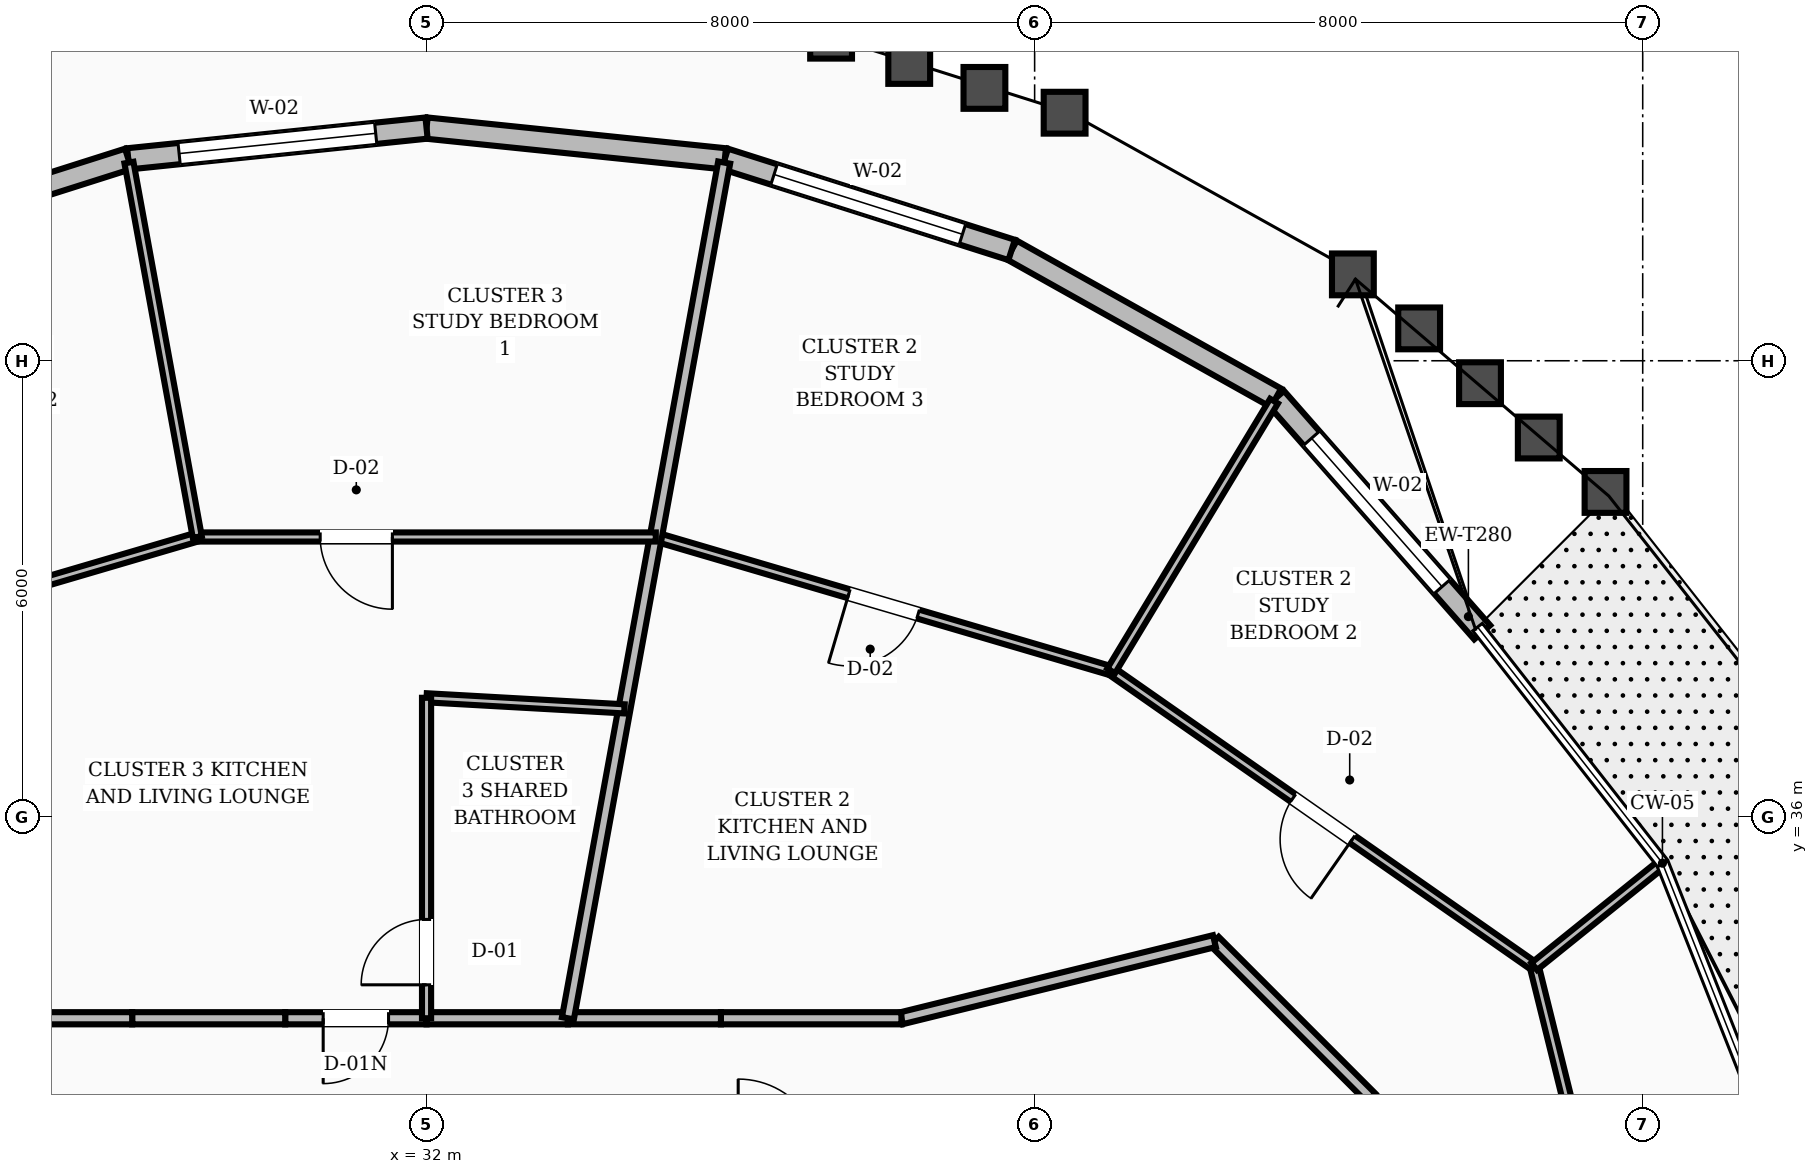
"""IFC4 building model, lengths in metres.
Left out: names, types, materials, properties, quantities, classifications, styles, units other than length and angle.
Written with IfcOpenShell. Run it as: python <this file> out.ifc"""

import sys

from ifc_helpers import new_model, si_unit, direction, frame, frame_2d, origin, place, context, subcontext, project, spatial, rectangle, extrude, element, fill, save


model = new_model("IFC4")
c1 = context("Model", 3, precision=1e-05, world=origin(), true_north=direction((0.0, 1.0)))
c2 = subcontext(c1, "Body", "Model", "MODEL_VIEW")
j1 = project(units=[si_unit("LENGTHUNIT", "METRE"), si_unit("PLANEANGLEUNIT", "RADIAN")], contexts=[c1])
p1 = place(None, origin())
s1 = spatial("IfcSite", under=j1, at=p1, CompositionType="ELEMENT")
p2 = place(p1, origin())
s2 = spatial("IfcBuilding", under=s1, at=p2, CompositionType="ELEMENT")
p3 = place(p2, frame((0.0, 0.0, 261.6)))
s3 = spatial("IfcBuildingStorey", under=s2, at=p3, CompositionType="ELEMENT", Elevation=261.6)
p4 = place(p3, frame((45.888, 38.427, 0.0), z_axis=(0.0, 0.0, 1.0), x_axis=(-0.660459054775, 0.750862062543, 0.0)))
e1 = element("IfcWall", 1, at=p4, inside=s3, PredefinedType="STANDARD", context=c2, shape_type="SweptSolid", body=[
    extrude(rectangle(XDim=4.108, YDim=0.28, at=frame_2d((2.054, 0.0))), origin(), (0.0, 0.0, 1.0), 2.88),
])
p5 = place(p4, frame((0.8, 0.0, 0.8)))
e2 = element("IfcOpeningElement", 2, at=p5, cuts=e1, PredefinedType="OPENING", context=c2, shape_type="SweptSolid", body=[
    extrude(rectangle(XDim=2.6, YDim=1.65, at=frame_2d((1.3, 0.825))), frame((0.0, 0.15, 0.0), z_axis=(0.0, -1.0, 0.0), x_axis=(1.0, 0.0, 0.0)), (0.0, 0.0, 1.0), 0.3),
])
p6 = place(p3, frame((43.175, 41.512, 0.0), z_axis=(0.0, 0.0, 1.0), x_axis=(-0.872627171538, 0.488386956719, 0.0)))
e3 = element("IfcWall", 3, at=p6, inside=s3, PredefinedType="STANDARD", context=c2, shape_type="SweptSolid", body=[
    extrude(rectangle(XDim=3.985, YDim=0.28, at=frame_2d((1.993, 0.0))), origin(), (0.0, 0.0, 1.0), 2.88),
])
p7 = place(p3, frame((39.698, 43.458, 0.0), z_axis=(0.0, 0.0, 1.0), x_axis=(-0.953082762893, 0.302709839741, 0.0)))
e4 = element("IfcWall", 4, at=p7, inside=s3, PredefinedType="STANDARD", context=c2, shape_type="SweptSolid", body=[
    extrude(rectangle(XDim=3.959, YDim=0.28, at=frame_2d((1.979, 0.0))), origin(), (0.0, 0.0, 1.0), 2.88),
])
p8 = place(p7, frame((0.68, 0.0, 0.8)))
e5 = element("IfcOpeningElement", 5, at=p8, cuts=e4, PredefinedType="OPENING", context=c2, shape_type="SweptSolid", body=[
    extrude(rectangle(XDim=2.6, YDim=1.65, at=frame_2d((1.3, 0.825))), frame((0.0, 0.15, 0.0), z_axis=(0.0, -1.0, 0.0), x_axis=(1.0, 0.0, 0.0)), (0.0, 0.0, 1.0), 0.3),
])
p9 = place(p3, frame((35.924, 44.656, 0.0), z_axis=(0.0, 0.0, 1.0), x_axis=(-0.994722327851, 0.10260355976, 0.0)))
e6 = element("IfcWall", 6, at=p9, inside=s3, PredefinedType="STANDARD", context=c2, shape_type="SweptSolid", body=[
    extrude(rectangle(XDim=3.945, YDim=0.28, at=frame_2d((1.973, 0.0))), origin(), (0.0, 0.0, 1.0), 2.88),
])
p10 = place(p3, frame((32.0, 45.061, 0.0), z_axis=(0.0, 0.0, 1.0), x_axis=(-0.994722327851, -0.10260355976, 0.0)))
e7 = element("IfcWall", 7, at=p10, inside=s3, PredefinedType="STANDARD", context=c2, shape_type="SweptSolid", body=[
    extrude(rectangle(XDim=3.945, YDim=0.28, at=frame_2d((1.973, 0.0))), origin(), (0.0, 0.0, 1.0), 2.88),
])
p11 = place(p10, frame((0.673, 0.0, 0.8)))
e8 = element("IfcOpeningElement", 8, at=p11, cuts=e7, PredefinedType="OPENING", context=c2, shape_type="SweptSolid", body=[
    extrude(rectangle(XDim=2.6, YDim=1.65, at=frame_2d((1.3, 0.825))), frame((0.0, 0.15, 0.0), z_axis=(0.0, -1.0, 0.0), x_axis=(1.0, 0.0, 0.0)), (0.0, 0.0, 1.0), 0.3),
])
p12 = place(p3, frame((28.076, 44.656, 0.0), z_axis=(0.0, 0.0, 1.0), x_axis=(-0.953082762893, -0.302709839741, 0.0)))
e9 = element("IfcWall", 9, at=p12, inside=s3, PredefinedType="STANDARD", context=c2, shape_type="SweptSolid", body=[
    extrude(rectangle(XDim=3.959, YDim=0.28, at=frame_2d((1.979, 0.0))), origin(), (0.0, 0.0, 1.0), 2.88),
])
p13 = place(p3, frame((44.427, 32.303, 0.0), z_axis=(0.0, 0.0, 1.0), x_axis=(-0.707106781187, 0.707106781187, 0.0)))
e10 = element("IfcWall", 10, at=p13, inside=s3, PredefinedType="SOLIDWALL", context=c2, shape_type="SweptSolid", body=[
    extrude(rectangle(XDim=2.916, YDim=0.16, at=frame_2d((1.458, 0.0))), origin(), (0.0, 0.0, 1.0), 2.87),
])
p14 = place(p3, frame((42.365, 34.365, 0.0), z_axis=(0.0, 0.0, 1.0), x_axis=(-0.970939799552, -0.239323850978, 0.0)))
e11 = element("IfcWall", 11, at=p14, inside=s3, PredefinedType="SOLIDWALL", context=c2, shape_type="SweptSolid", body=[
    extrude(rectangle(XDim=4.241, YDim=0.16, at=frame_2d((2.12, 0.0))), origin(), (0.0, 0.0, 1.0), 2.87),
])
p15 = place(p3, frame((38.248, 33.35, 0.0), z_axis=(0.0, 0.0, 1.0), x_axis=(-1.0, 0.0, 0.0)))
e12 = element("IfcWall", 12, at=p15, inside=s3, PredefinedType="SOLIDWALL", context=c2, shape_type="SweptSolid", body=[
    extrude(rectangle(XDim=2.375, YDim=0.16, at=frame_2d((1.188, 0.0))), origin(), (0.0, 0.0, 1.0), 2.87),
])
p16 = place(p3, frame((35.873, 33.35, 0.0), z_axis=(0.0, 0.0, 1.0), x_axis=(-1.0, 0.0, 0.0)))
e13 = element("IfcWall", 13, at=p16, inside=s3, PredefinedType="SOLIDWALL", context=c2, shape_type="SweptSolid", body=[
    extrude(rectangle(XDim=2.013, YDim=0.16, at=frame_2d((1.006, 0.0))), origin(), (0.0, 0.0, 1.0), 2.87),
])
p17 = place(p3, frame((33.86, 33.35, 0.0), z_axis=(0.0, 0.0, 1.0), x_axis=(-1.0, 0.0, 0.0)))
e14 = element("IfcWall", 14, at=p17, inside=s3, PredefinedType="SOLIDWALL", context=c2, shape_type="SweptSolid", body=[
    extrude(rectangle(XDim=1.86, YDim=0.16, at=frame_2d((0.93, 0.0))), origin(), (0.0, 0.0, 1.0), 2.87),
])
p18 = place(p3, frame((32.0, 33.35, 0.0), z_axis=(0.0, 0.0, 1.0), x_axis=(-1.0, 0.0, 0.0)))
e15 = element("IfcWall", 15, at=p18, inside=s3, PredefinedType="SOLIDWALL", context=c2, shape_type="SweptSolid", body=[
    extrude(rectangle(XDim=1.86, YDim=0.16, at=frame_2d((0.93, 0.0))), origin(), (0.0, 0.0, 1.0), 2.87),
])
p19 = place(p18, frame((0.5, 0.0, 0.0)))
e16 = element("IfcOpeningElement", 16, at=p19, cuts=e15, PredefinedType="OPENING", context=c2, shape_type="SweptSolid", body=[
    extrude(rectangle(XDim=0.86, YDim=2.1, at=frame_2d((0.43, 1.05))), frame((0.0, 0.09, 0.0), z_axis=(0.0, -1.0, 0.0), x_axis=(1.0, 0.0, 0.0)), (0.0, 0.0, 1.0), 0.18),
])
p20 = place(p3, frame((30.14, 33.35, 0.0), z_axis=(0.0, 0.0, 1.0), x_axis=(-1.0, 0.0, 0.0)))
e17 = element("IfcWall", 17, at=p20, inside=s3, PredefinedType="SOLIDWALL", context=c2, shape_type="SweptSolid", body=[
    extrude(rectangle(XDim=2.013, YDim=0.16, at=frame_2d((1.006, 0.0))), origin(), (0.0, 0.0, 1.0), 2.87),
])
p21 = place(p3, frame((28.127, 33.35, 0.0), z_axis=(0.0, 0.0, 1.0), x_axis=(-1.0, 0.0, 0.0)))
e18 = element("IfcWall", 18, at=p21, inside=s3, PredefinedType="SOLIDWALL", context=c2, shape_type="SweptSolid", body=[
    extrude(rectangle(XDim=2.375, YDim=0.16, at=frame_2d((1.188, 0.0))), origin(), (0.0, 0.0, 1.0), 2.87),
])
p22 = place(p3, frame((48.232, 27.332, 0.0), z_axis=(0.0, 0.0, 1.0), x_axis=(-0.240321088177, 0.970693450363, 0.0)))
e19 = element("IfcWall", 19, at=p22, inside=s3, PredefinedType="PARTITIONING", context=c2, shape_type="SweptSolid", body=[
    extrude(rectangle(XDim=6.902, YDim=0.12, at=frame_2d((3.451, 0.0))), origin(), (0.0, 0.0, 1.0), 2.87),
])
p23 = place(p22, frame((4.092, 0.0, 0.0)))
e20 = element("IfcOpeningElement", 20, at=p23, cuts=e19, PredefinedType="OPENING", context=c2, shape_type="SweptSolid", body=[
    extrude(rectangle(XDim=0.95, YDim=2.1, at=frame_2d((0.475, 1.05))), frame((0.0, 0.07, 0.0), z_axis=(0.0, -1.0, 0.0), x_axis=(1.0, 0.0, 0.0)), (0.0, 0.0, 1.0), 0.14),
])
p24 = place(p3, frame((46.573, 34.032, 0.0), z_axis=(0.0, 0.0, 1.0), x_axis=(-0.819731618805, 0.572747826824, 0.0)))
e21 = element("IfcWall", 21, at=p24, inside=s3, PredefinedType="PARTITIONING", context=c2, shape_type="SweptSolid", body=[
    extrude(rectangle(XDim=6.79, YDim=0.12, at=frame_2d((3.395, 0.0))), origin(), (0.0, 0.0, 1.0), 2.87),
])
p25 = place(p24, frame((2.92, 0.0, 0.0)))
e22 = element("IfcOpeningElement", 22, at=p25, cuts=e21, PredefinedType="OPENING", context=c2, shape_type="SweptSolid", body=[
    extrude(rectangle(XDim=0.95, YDim=2.1, at=frame_2d((0.475, 1.05))), frame((0.0, 0.07, 0.0), z_axis=(0.0, -1.0, 0.0), x_axis=(1.0, 0.0, 0.0)), (0.0, 0.0, 1.0), 0.14),
])
p26 = place(p3, frame((46.573, 34.032, 0.0), z_axis=(0.0, 0.0, 1.0), x_axis=(0.778905804769, 0.62714093097, 0.0)))
e23 = element("IfcWall", 23, at=p26, inside=s3, PredefinedType="PARTITIONING", context=c2, shape_type="SweptSolid", body=[
    extrude(rectangle(XDim=2.115, YDim=0.12, at=frame_2d((1.058, 0.0))), origin(), (0.0, 0.0, 1.0), 2.87),
])
p27 = place(p3, frame((41.007, 37.921, 0.0), z_axis=(0.0, 0.0, 1.0), x_axis=(-0.959414668212, 0.281999103578, 0.0)))
e24 = element("IfcWall", 24, at=p27, inside=s3, PredefinedType="PARTITIONING", context=c2, shape_type="SweptSolid", body=[
    extrude(rectangle(XDim=6.245, YDim=0.12, at=frame_2d((3.122, 0.0))), origin(), (0.0, 0.0, 1.0), 2.87),
])
p28 = place(p27, frame((2.647, 0.0, 0.0)))
e25 = element("IfcOpeningElement", 25, at=p28, cuts=e24, PredefinedType="OPENING", context=c2, shape_type="SweptSolid", body=[
    extrude(rectangle(XDim=0.95, YDim=2.1, at=frame_2d((0.475, 1.05))), frame((0.0, 0.07, 0.0), z_axis=(0.0, -1.0, 0.0), x_axis=(1.0, 0.0, 0.0)), (0.0, 0.0, 1.0), 0.14),
])
p29 = place(p3, frame((41.007, 37.921, 0.0), z_axis=(0.0, 0.0, 1.0), x_axis=(0.516901675456, 0.856044775646, 0.0)))
e26 = element("IfcWall", 26, at=p29, inside=s3, PredefinedType="PARTITIONING", context=c2, shape_type="SweptSolid", body=[
    extrude(rectangle(XDim=4.145, YDim=0.12, at=frame_2d((2.073, 0.0))), origin(), (0.0, 0.0, 1.0), 2.87),
])
p30 = place(p3, frame((33.86, 33.35, 0.0), z_axis=(0.0, 0.0, 1.0), x_axis=(0.17961571379, 0.9837368527, 0.0)))
e27 = element("IfcWall", 27, at=p30, inside=s3, PredefinedType="SOLIDWALL", context=c2, shape_type="SweptSolid", body=[
    extrude(rectangle(XDim=11.443, YDim=0.16, at=frame_2d((5.722, 0.0))), origin(), (0.0, 0.0, 1.0), 2.87),
])
p31 = place(p3, frame((34.603, 37.42, 0.0), z_axis=(0.0, 0.0, 1.0), x_axis=(-0.998441277422, 0.055812324268, 0.0)))
e28 = element("IfcWall", 28, at=p31, inside=s3, PredefinedType="PARTITIONING", context=c2, shape_type="SweptSolid", body=[
    extrude(rectangle(XDim=2.607, YDim=0.12, at=frame_2d((1.304, 0.0))), origin(), (0.0, 0.0, 1.0), 2.87),
])
p32 = place(p3, frame((32.0, 33.35, 0.0), z_axis=(0.0, 0.0, 1.0), x_axis=(0.0, 1.0, 0.0)))
e29 = element("IfcWall", 29, at=p32, inside=s3, PredefinedType="PARTITIONING", context=c2, shape_type="SweptSolid", body=[
    extrude(rectangle(XDim=4.216, YDim=0.12, at=frame_2d((2.108, 0.0))), origin(), (0.0, 0.0, 1.0), 2.87),
])
p33 = place(p32, frame((0.44, 0.0, 0.0)))
e30 = element("IfcOpeningElement", 30, at=p33, cuts=e29, PredefinedType="OPENING", context=c2, shape_type="SweptSolid", body=[
    extrude(rectangle(XDim=0.86, YDim=2.1, at=frame_2d((0.43, 1.05))), frame((0.0, 0.07, 0.0), z_axis=(0.0, -1.0, 0.0), x_axis=(1.0, 0.0, 0.0)), (0.0, 0.0, 1.0), 0.14),
])
p34 = place(p3, frame((35.016, 39.682, 0.0), z_axis=(0.0, 0.0, 1.0), x_axis=(-1.0, 0.0, 0.0)))
e31 = element("IfcWall", 31, at=p34, inside=s3, PredefinedType="PARTITIONING", context=c2, shape_type="SweptSolid", body=[
    extrude(rectangle(XDim=6.032, YDim=0.12, at=frame_2d((3.016, 0.0))), origin(), (0.0, 0.0, 1.0), 2.87),
])
p35 = place(p34, frame((3.465, 0.0, 0.0)))
e32 = element("IfcOpeningElement", 32, at=p35, cuts=e31, PredefinedType="OPENING", context=c2, shape_type="SweptSolid", body=[
    extrude(rectangle(XDim=0.95, YDim=2.1, at=frame_2d((0.475, 1.05))), frame((0.0, 0.07, 0.0), z_axis=(0.0, -1.0, 0.0), x_axis=(1.0, 0.0, 0.0)), (0.0, 0.0, 1.0), 0.14),
])
p36 = place(p3, frame((28.984, 39.682, 0.0), z_axis=(0.0, 0.0, 1.0), x_axis=(-0.959414668212, -0.281999103578, 0.0)))
e33 = element("IfcWall", 33, at=p36, inside=s3, PredefinedType="PARTITIONING", context=c2, shape_type="SweptSolid", body=[
    extrude(rectangle(XDim=6.245, YDim=0.12, at=frame_2d((3.122, 0.0))), origin(), (0.0, 0.0, 1.0), 2.87),
])
p37 = place(p36, frame((2.647, 0.0, 0.0)))
e34 = element("IfcOpeningElement", 34, at=p37, cuts=e33, PredefinedType="OPENING", context=c2, shape_type="SweptSolid", body=[
    extrude(rectangle(XDim=0.95, YDim=2.1, at=frame_2d((0.475, 1.05))), frame((0.0, 0.07, 0.0), z_axis=(0.0, -1.0, 0.0), x_axis=(1.0, 0.0, 0.0)), (0.0, 0.0, 1.0), 0.14),
])
p38 = place(p3, frame((28.984, 39.682, 0.0), z_axis=(0.0, 0.0, 1.0), x_axis=(-0.179623384496, 0.983735452112, 0.0)))
e35 = element("IfcWall", 35, at=p38, inside=s3, PredefinedType="PARTITIONING", context=c2, shape_type="SweptSolid", body=[
    extrude(rectangle(XDim=5.007, YDim=0.12, at=frame_2d((2.504, 0.0))), origin(), (0.0, 0.0, 1.0), 2.87),
])
p39 = place(p5, origin())
e36 = element("IfcWindow", 36, at=p39, inside=s3, PartitioningType="SINGLE_PANEL", PredefinedType="WINDOW", context=c2, shape_type="SweptSolid", body=[
    extrude(rectangle(XDim=2.6, YDim=1.65, at=frame_2d((1.3, 0.825))), frame((0.0, 0.03, 0.0), z_axis=(0.0, -1.0, 0.0), x_axis=(1.0, 0.0, 0.0)), (0.0, 0.0, 1.0), 0.06),
])
fill(e2, e36)
p40 = place(p8, origin())
e37 = element("IfcWindow", 37, at=p40, inside=s3, PartitioningType="SINGLE_PANEL", PredefinedType="WINDOW", context=c2, shape_type="SweptSolid", body=[
    extrude(rectangle(XDim=2.6, YDim=1.65, at=frame_2d((1.3, 0.825))), frame((0.0, 0.03, 0.0), z_axis=(0.0, -1.0, 0.0), x_axis=(1.0, 0.0, 0.0)), (0.0, 0.0, 1.0), 0.06),
])
fill(e5, e37)
p41 = place(p11, origin())
e38 = element("IfcWindow", 38, at=p41, inside=s3, PartitioningType="SINGLE_PANEL", PredefinedType="WINDOW", context=c2, shape_type="SweptSolid", body=[
    extrude(rectangle(XDim=2.6, YDim=1.65, at=frame_2d((1.3, 0.825))), frame((0.0, 0.03, 0.0), z_axis=(0.0, -1.0, 0.0), x_axis=(1.0, 0.0, 0.0)), (0.0, 0.0, 1.0), 0.06),
])
fill(e8, e38)
p42 = place(p25, origin())
e39 = element("IfcDoor", 39, at=p42, inside=s3, OperationType="SINGLE_SWING_LEFT", PredefinedType="DOOR", context=c2, shape_type="SweptSolid", body=[
    extrude(rectangle(XDim=0.95, YDim=2.1, at=frame_2d((0.475, 1.05))), frame((0.0, 0.025, 0.0), z_axis=(0.0, -1.0, 0.0), x_axis=(1.0, 0.0, 0.0)), (0.0, 0.0, 1.0), 0.05),
])
fill(e22, e39)
p43 = place(p28, origin())
e40 = element("IfcDoor", 40, at=p43, inside=s3, OperationType="SINGLE_SWING_RIGHT", PredefinedType="DOOR", context=c2, shape_type="SweptSolid", body=[
    extrude(rectangle(XDim=0.95, YDim=2.1, at=frame_2d((0.475, 1.05))), frame((0.0, 0.025, 0.0), z_axis=(0.0, -1.0, 0.0), x_axis=(1.0, 0.0, 0.0)), (0.0, 0.0, 1.0), 0.05),
])
fill(e25, e40)
p44 = place(p33, origin())
e41 = element("IfcDoor", 41, at=p44, inside=s3, OperationType="SINGLE_SWING_LEFT", PredefinedType="DOOR", context=c2, shape_type="SweptSolid", body=[
    extrude(rectangle(XDim=0.86, YDim=2.1, at=frame_2d((0.43, 1.05))), frame((0.0, 0.025, 0.0), z_axis=(0.0, -1.0, 0.0), x_axis=(1.0, 0.0, 0.0)), (0.0, 0.0, 1.0), 0.05),
])
fill(e30, e41)
p45 = place(p19, origin())
e42 = element("IfcDoor", 42, at=p45, inside=s3, OperationType="SINGLE_SWING_RIGHT", PredefinedType="DOOR", context=c2, shape_type="SweptSolid", body=[
    extrude(rectangle(XDim=0.86, YDim=2.1, at=frame_2d((0.43, 1.05))), frame((0.0, 0.025, 0.0), z_axis=(0.0, -1.0, 0.0), x_axis=(1.0, 0.0, 0.0)), (0.0, 0.0, 1.0), 0.05),
])
fill(e16, e42)
p46 = place(p35, origin())
e43 = element("IfcDoor", 43, at=p46, inside=s3, OperationType="SINGLE_SWING_LEFT", PredefinedType="DOOR", context=c2, shape_type="SweptSolid", body=[
    extrude(rectangle(XDim=0.95, YDim=2.1, at=frame_2d((0.475, 1.05))), frame((0.0, 0.025, 0.0), z_axis=(0.0, -1.0, 0.0), x_axis=(1.0, 0.0, 0.0)), (0.0, 0.0, 1.0), 0.05),
])
fill(e32, e43)
save(model, sys.argv[1])
